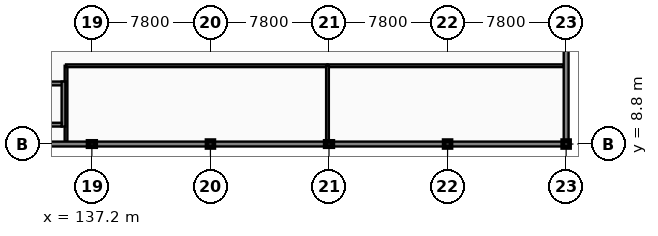
"""IFC4 building model, lengths in metres.
Left out: names, types, materials, properties, quantities, classifications, styles, units other than length and angle.
Written with IfcOpenShell. Run it as: python <this file> out.ifc"""

import sys

from ifc_helpers import new_model, si_unit, direction, frame, frame_2d, origin, origin_2d, place, context, subcontext, project, spatial, rectangle, extrude, element, fill, save


model = new_model("IFC4")
c1 = context("Model", 3, precision=1e-05, world=origin(), true_north=direction((0.0, 1.0)))
c2 = subcontext(c1, "Body", "Model", "MODEL_VIEW")
j1 = project(units=[si_unit("LENGTHUNIT", "METRE"), si_unit("PLANEANGLEUNIT", "RADIAN")], contexts=[c1])
p1 = place(None, origin())
s1 = spatial("IfcSite", under=j1, at=p1, CompositionType="ELEMENT")
p2 = place(p1, origin())
s2 = spatial("IfcBuilding", under=s1, at=p2, CompositionType="ELEMENT")
p3 = place(p2, origin())
s3 = spatial("IfcBuildingStorey", under=s2, at=p3, CompositionType="ELEMENT", Elevation=0.0)
p4 = place(p3, frame((137.2, 8.8, 0.0), z_axis=(0.0, 0.0, 1.0), x_axis=(1.0, 0.0, 0.0)))
e1 = element("IfcColumn", 1, at=p4, inside=s3, PredefinedType="PILASTER", context=c2, shape_type="SweptSolid", body=[
    extrude(rectangle(XDim=0.5, YDim=0.35, at=origin_2d()), origin(), (0.0, 0.0, 1.0), 5.4),
])
p5 = place(p3, frame((145.0, 8.8, 0.0), z_axis=(0.0, 0.0, 1.0), x_axis=(1.0, 0.0, 0.0)))
e2 = element("IfcColumn", 2, at=p5, inside=s3, PredefinedType="COLUMN", context=c2, shape_type="SweptSolid", body=[
    extrude(rectangle(XDim=0.45, YDim=0.45, at=origin_2d()), origin(), (0.0, 0.0, 1.0), 5.4),
])
p6 = place(p3, frame((152.8, 8.8, 0.0), z_axis=(0.0, 0.0, 1.0), x_axis=(1.0, 0.0, 0.0)))
e3 = element("IfcColumn", 3, at=p6, inside=s3, PredefinedType="PILASTER", context=c2, shape_type="SweptSolid", body=[
    extrude(rectangle(XDim=0.5, YDim=0.35, at=origin_2d()), origin(), (0.0, 0.0, 1.0), 5.4),
])
for number, where, z_axis, x_axis in (
    (4, (160.6, 8.8, 0.0), (0.0, 0.0, 1.0), (1.0, 0.0, 0.0)),
    (5, (168.4, 8.8, 0.0), (0.0, 0.0, 1.0), (1.0, 0.0, 0.0)),
):
    element("IfcColumn", number, at=place(p3, frame(where, z_axis=z_axis, x_axis=x_axis)), inside=s3, PredefinedType="COLUMN", context=c2, shape_type="SweptSolid", body=[
        extrude(rectangle(XDim=0.45, YDim=0.45, at=origin_2d()), origin(), (0.0, 0.0, 1.0), 5.4),
    ])
p7 = place(p3, frame((135.5, 8.95, 0.0), z_axis=(0.0, 0.0, 1.0), x_axis=(0.0, 1.0, 0.0)))
e6 = element("IfcWall", 6, at=p7, inside=s3, PredefinedType="PARTITIONING", context=c2, shape_type="SweptSolid", body=[
    extrude(rectangle(XDim=5.0, YDim=0.18, at=frame_2d((2.5, 0.0))), origin(), (0.0, 0.0, 1.0), 4.64),
])
p8 = place(p3, frame((135.5, 13.95, 0.0), z_axis=(0.0, 0.0, 1.0), x_axis=(1.0, 0.0, 0.0)))
e7 = element("IfcWall", 7, at=p8, inside=s3, PredefinedType="PARTITIONING", context=c2, shape_type="SweptSolid", body=[
    extrude(rectangle(XDim=17.2, YDim=0.18, at=frame_2d((8.6, 0.0))), origin(), (0.0, 0.0, 1.0), 4.64),
])
p9 = place(p8, frame((7.29, 0.0, -0.01)))
e8 = element("IfcOpeningElement", 8, at=p9, cuts=e7, PredefinedType="OPENING", context=c2, shape_type="SweptSolid", body=[
    extrude(rectangle(XDim=1.0, YDim=2.16, at=frame_2d((0.5, 1.08))), frame((0.0, 0.1, 0.0), z_axis=(0.0, -1.0, 0.0), x_axis=(1.0, 0.0, 0.0)), (0.0, 0.0, 1.0), 0.2),
])
p10 = place(p3, frame((152.7, 13.95, 0.0), z_axis=(0.0, 0.0, 1.0), x_axis=(1.0, 0.0, 0.0)))
e9 = element("IfcWall", 9, at=p10, inside=s3, PredefinedType="PARTITIONING", context=c2, shape_type="SweptSolid", body=[
    extrude(rectangle(XDim=15.55, YDim=0.18, at=frame_2d((7.775, 0.0))), origin(), (0.0, 0.0, 1.0), 4.64),
])
p11 = place(p10, frame((6.548, 0.0, -0.01)))
e10 = element("IfcOpeningElement", 10, at=p11, cuts=e9, PredefinedType="OPENING", context=c2, shape_type="SweptSolid", body=[
    extrude(rectangle(XDim=1.0, YDim=2.16, at=frame_2d((0.5, 1.08))), frame((0.0, 0.1, 0.0), z_axis=(0.0, -1.0, 0.0), x_axis=(1.0, 0.0, 0.0)), (0.0, 0.0, 1.0), 0.2),
])
p12 = place(p3, frame((152.7, 8.95, 0.0), z_axis=(0.0, 0.0, 1.0), x_axis=(0.0, 1.0, 0.0)))
e11 = element("IfcWall", 11, at=p12, inside=s3, PredefinedType="PARTITIONING", context=c2, shape_type="SweptSolid", body=[
    extrude(rectangle(XDim=5.0, YDim=0.18, at=frame_2d((2.5, 0.0))), origin(), (0.0, 0.0, 1.0), 4.64),
])
p13 = place(p3, frame((129.4, 8.8, 0.0), z_axis=(0.0, 0.0, 1.0), x_axis=(1.0, 0.0, 0.0)))
e12 = element("IfcWall", 12, at=p13, inside=s3, PredefinedType="SOLIDWALL", context=c2, shape_type="SweptSolid", body=[
    extrude(rectangle(XDim=7.8, YDim=0.32, at=frame_2d((3.9, 0.0))), origin(), (0.0, 0.0, 1.0), 4.64),
])
p14 = place(p13, frame((0.46, 0.0, 0.9)))
e13 = element("IfcOpeningElement", 13, at=p14, cuts=e12, PredefinedType="OPENING", context=c2, shape_type="SweptSolid", body=[
    extrude(rectangle(XDim=2.4, YDim=2.35, at=frame_2d((1.2, 1.175))), frame((0.0, 0.17, 0.0), z_axis=(0.0, -1.0, 0.0), x_axis=(1.0, 0.0, 0.0)), (0.0, 0.0, 1.0), 0.34),
])
p15 = place(p13, frame((3.46, 0.0, 0.9)))
e14 = element("IfcOpeningElement", 14, at=p15, cuts=e12, PredefinedType="OPENING", context=c2, shape_type="SweptSolid", body=[
    extrude(rectangle(XDim=2.4, YDim=2.35, at=frame_2d((1.2, 1.175))), frame((0.0, 0.17, 0.0), z_axis=(0.0, -1.0, 0.0), x_axis=(1.0, 0.0, 0.0)), (0.0, 0.0, 1.0), 0.34),
])
p16 = place(p3, frame((137.2, 8.8, 0.0), z_axis=(0.0, 0.0, 1.0), x_axis=(1.0, 0.0, 0.0)))
e15 = element("IfcWall", 15, at=p16, inside=s3, PredefinedType="SOLIDWALL", context=c2, shape_type="SweptSolid", body=[
    extrude(rectangle(XDim=7.8, YDim=0.32, at=frame_2d((3.9, 0.0))), origin(), (0.0, 0.0, 1.0), 4.64),
])
p17 = place(p16, frame((2.9, 0.0, -0.01)))
e16 = element("IfcOpeningElement", 16, at=p17, cuts=e15, PredefinedType="OPENING", context=c2, shape_type="SweptSolid", body=[
    extrude(rectangle(XDim=2.0, YDim=2.41, at=frame_2d((1.0, 1.205))), frame((0.0, 0.17, 0.0), z_axis=(0.0, -1.0, 0.0), x_axis=(1.0, 0.0, 0.0)), (0.0, 0.0, 1.0), 0.34),
])
p18 = place(p3, frame((145.0, 8.8, 0.0), z_axis=(0.0, 0.0, 1.0), x_axis=(1.0, 0.0, 0.0)))
e17 = element("IfcWall", 17, at=p18, inside=s3, PredefinedType="SOLIDWALL", context=c2, shape_type="SweptSolid", body=[
    extrude(rectangle(XDim=7.8, YDim=0.32, at=frame_2d((3.9, 0.0))), origin(), (0.0, 0.0, 1.0), 4.64),
])
p19 = place(p18, frame((0.46, 0.0, 0.9)))
e18 = element("IfcOpeningElement", 18, at=p19, cuts=e17, PredefinedType="OPENING", context=c2, shape_type="SweptSolid", body=[
    extrude(rectangle(XDim=2.4, YDim=2.35, at=frame_2d((1.2, 1.175))), frame((0.0, 0.17, 0.0), z_axis=(0.0, -1.0, 0.0), x_axis=(1.0, 0.0, 0.0)), (0.0, 0.0, 1.0), 0.34),
])
p20 = place(p18, frame((4.86, 0.0, 0.9)))
e19 = element("IfcOpeningElement", 19, at=p20, cuts=e17, PredefinedType="OPENING", context=c2, shape_type="SweptSolid", body=[
    extrude(rectangle(XDim=2.4, YDim=2.35, at=frame_2d((1.2, 1.175))), frame((0.0, 0.17, 0.0), z_axis=(0.0, -1.0, 0.0), x_axis=(1.0, 0.0, 0.0)), (0.0, 0.0, 1.0), 0.34),
])
p21 = place(p3, frame((152.8, 8.8, 0.0), z_axis=(0.0, 0.0, 1.0), x_axis=(1.0, 0.0, 0.0)))
e20 = element("IfcWall", 20, at=p21, inside=s3, PredefinedType="SOLIDWALL", context=c2, shape_type="SweptSolid", body=[
    extrude(rectangle(XDim=7.8, YDim=0.32, at=frame_2d((3.9, 0.0))), origin(), (0.0, 0.0, 1.0), 4.64),
])
p22 = place(p21, frame((0.46, 0.0, 0.9)))
e21 = element("IfcOpeningElement", 21, at=p22, cuts=e20, PredefinedType="OPENING", context=c2, shape_type="SweptSolid", body=[
    extrude(rectangle(XDim=2.4, YDim=2.35, at=frame_2d((1.2, 1.175))), frame((0.0, 0.17, 0.0), z_axis=(0.0, -1.0, 0.0), x_axis=(1.0, 0.0, 0.0)), (0.0, 0.0, 1.0), 0.34),
])
p23 = place(p21, frame((4.86, 0.0, 0.9)))
e22 = element("IfcOpeningElement", 22, at=p23, cuts=e20, PredefinedType="OPENING", context=c2, shape_type="SweptSolid", body=[
    extrude(rectangle(XDim=2.4, YDim=2.35, at=frame_2d((1.2, 1.175))), frame((0.0, 0.17, 0.0), z_axis=(0.0, -1.0, 0.0), x_axis=(1.0, 0.0, 0.0)), (0.0, 0.0, 1.0), 0.34),
])
p24 = place(p3, frame((160.6, 8.8, 0.0), z_axis=(0.0, 0.0, 1.0), x_axis=(1.0, 0.0, 0.0)))
e23 = element("IfcWall", 23, at=p24, inside=s3, PredefinedType="SOLIDWALL", context=c2, shape_type="SweptSolid", body=[
    extrude(rectangle(XDim=7.8, YDim=0.32, at=frame_2d((3.9, 0.0))), origin(), (0.0, 0.0, 1.0), 4.64),
])
p25 = place(p24, frame((0.46, 0.0, 0.9)))
e24 = element("IfcOpeningElement", 24, at=p25, cuts=e23, PredefinedType="OPENING", context=c2, shape_type="SweptSolid", body=[
    extrude(rectangle(XDim=2.4, YDim=2.35, at=frame_2d((1.2, 1.175))), frame((0.0, 0.17, 0.0), z_axis=(0.0, -1.0, 0.0), x_axis=(1.0, 0.0, 0.0)), (0.0, 0.0, 1.0), 0.34),
])
p26 = place(p24, frame((4.86, 0.0, 0.9)))
e25 = element("IfcOpeningElement", 25, at=p26, cuts=e23, PredefinedType="OPENING", context=c2, shape_type="SweptSolid", body=[
    extrude(rectangle(XDim=2.4, YDim=2.35, at=frame_2d((1.2, 1.175))), frame((0.0, 0.17, 0.0), z_axis=(0.0, -1.0, 0.0), x_axis=(1.0, 0.0, 0.0)), (0.0, 0.0, 1.0), 0.34),
])
p27 = place(p3, frame((168.4, 8.8, 0.0), z_axis=(0.0, 0.0, 1.0), x_axis=(0.0, 1.0, 0.0)))
e26 = element("IfcWall", 26, at=p27, inside=s3, PredefinedType="SOLIDWALL", context=c2, shape_type="SweptSolid", body=[
    extrude(rectangle(XDim=7.2, YDim=0.32, at=frame_2d((3.6, 0.0))), origin(), (0.0, 0.0, 1.0), 4.54),
])
p28 = place(p27, frame((0.46, 0.0, 0.9)))
e27 = element("IfcOpeningElement", 27, at=p28, cuts=e26, PredefinedType="OPENING", context=c2, shape_type="SweptSolid", body=[
    extrude(rectangle(XDim=1.8, YDim=2.2, at=frame_2d((0.9, 1.1))), frame((0.0, 0.17, 0.0), z_axis=(0.0, -1.0, 0.0), x_axis=(1.0, 0.0, 0.0)), (0.0, 0.0, 1.0), 0.34),
])
p29 = place(p27, frame((3.06, 0.0, 0.9)))
e28 = element("IfcOpeningElement", 28, at=p29, cuts=e26, PredefinedType="OPENING", context=c2, shape_type="SweptSolid", body=[
    extrude(rectangle(XDim=1.8, YDim=2.2, at=frame_2d((0.9, 1.1))), frame((0.0, 0.17, 0.0), z_axis=(0.0, -1.0, 0.0), x_axis=(1.0, 0.0, 0.0)), (0.0, 0.0, 1.0), 0.34),
])
p30 = place(p3, frame((133.25, 12.785, 0.0), z_axis=(0.0, 0.0, 1.0), x_axis=(1.0, 0.0, 0.0)))
e29 = element("IfcWall", 29, at=p30, inside=s3, PredefinedType="SHEAR", context=c2, shape_type="SweptSolid", body=[
    extrude(rectangle(XDim=2.21, YDim=0.25, at=frame_2d((1.105, 0.0))), origin(), (0.0, 0.0, 1.0), 5.4),
])
p31 = place(p3, frame((135.335, 9.95, 0.0), z_axis=(0.0, 0.0, 1.0), x_axis=(0.0, 1.0, 0.0)))
e30 = element("IfcWall", 30, at=p31, inside=s3, PredefinedType="SHEAR", context=c2, shape_type="SweptSolid", body=[
    extrude(rectangle(XDim=2.96, YDim=0.25, at=frame_2d((1.48, 0.0))), origin(), (0.0, 0.0, 1.0), 5.4),
])
p32 = place(p3, frame((133.25, 10.075, 0.0), z_axis=(0.0, 0.0, 1.0), x_axis=(1.0, 0.0, 0.0)))
e31 = element("IfcWall", 31, at=p32, inside=s3, PredefinedType="SHEAR", context=c2, shape_type="SweptSolid", body=[
    extrude(rectangle(XDim=1.96, YDim=0.25, at=frame_2d((0.98, 0.0))), origin(), (0.0, 0.0, 1.0), 5.4),
])
p33 = place(p32, frame((0.43, 0.0, -0.01)))
e32 = element("IfcOpeningElement", 32, at=p33, cuts=e31, PredefinedType="OPENING", context=c2, shape_type="SweptSolid", body=[
    extrude(rectangle(XDim=1.1, YDim=2.16, at=frame_2d((0.55, 1.08))), frame((0.0, 0.135, 0.0), z_axis=(0.0, -1.0, 0.0), x_axis=(1.0, 0.0, 0.0)), (0.0, 0.0, 1.0), 0.27),
])
p34 = place(p9, frame((0.0, 0.0, 0.01)))
e33 = element("IfcDoor", 33, at=p34, inside=s3, OperationType="SINGLE_SWING_RIGHT", PredefinedType="DOOR", context=c2, shape_type="SweptSolid", body=[
    extrude(rectangle(XDim=1.0, YDim=2.15, at=frame_2d((0.5, 1.075))), frame((0.0, 0.025, 0.0), z_axis=(0.0, -1.0, 0.0), x_axis=(1.0, 0.0, 0.0)), (0.0, 0.0, 1.0), 0.05),
])
fill(e8, e33)
p35 = place(p11, frame((0.0, 0.0, 0.01)))
e34 = element("IfcDoor", 34, at=p35, inside=s3, OperationType="SINGLE_SWING_LEFT", PredefinedType="DOOR", context=c2, shape_type="SweptSolid", body=[
    extrude(rectangle(XDim=1.0, YDim=2.15, at=frame_2d((0.5, 1.075))), frame((0.0, 0.025, 0.0), z_axis=(0.0, -1.0, 0.0), x_axis=(1.0, 0.0, 0.0)), (0.0, 0.0, 1.0), 0.05),
])
fill(e10, e34)
p36 = place(p15, origin())
e35 = element("IfcWindow", 35, at=p36, inside=s3, PartitioningType="TRIPLE_PANEL_VERTICAL", PredefinedType="WINDOW", context=c2, shape_type="SweptSolid", body=[
    extrude(rectangle(XDim=2.4, YDim=2.35, at=frame_2d((1.2, 1.175))), frame((0.0, 0.03, 0.0), z_axis=(0.0, -1.0, 0.0), x_axis=(1.0, 0.0, 0.0)), (0.0, 0.0, 1.0), 0.06),
])
fill(e14, e35)
p37 = place(p17, frame((0.0, 0.0, 0.01)))
e36 = element("IfcDoor", 36, at=p37, inside=s3, OperationType="DOUBLE_SWING_LEFT", PredefinedType="DOOR", context=c2, shape_type="SweptSolid", body=[
    extrude(rectangle(XDim=2.0, YDim=2.4, at=frame_2d((1.0, 1.2))), frame((0.0, 0.025, 0.0), z_axis=(0.0, -1.0, 0.0), x_axis=(1.0, 0.0, 0.0)), (0.0, 0.0, 1.0), 0.05),
])
fill(e16, e36)
p38 = place(p19, origin())
e37 = element("IfcWindow", 37, at=p38, inside=s3, PartitioningType="TRIPLE_PANEL_VERTICAL", PredefinedType="WINDOW", context=c2, shape_type="SweptSolid", body=[
    extrude(rectangle(XDim=2.4, YDim=2.35, at=frame_2d((1.2, 1.175))), frame((0.0, 0.03, 0.0), z_axis=(0.0, -1.0, 0.0), x_axis=(1.0, 0.0, 0.0)), (0.0, 0.0, 1.0), 0.06),
])
fill(e18, e37)
p39 = place(p20, origin())
e38 = element("IfcWindow", 38, at=p39, inside=s3, PartitioningType="TRIPLE_PANEL_VERTICAL", PredefinedType="WINDOW", context=c2, shape_type="SweptSolid", body=[
    extrude(rectangle(XDim=2.4, YDim=2.35, at=frame_2d((1.2, 1.175))), frame((0.0, 0.03, 0.0), z_axis=(0.0, -1.0, 0.0), x_axis=(1.0, 0.0, 0.0)), (0.0, 0.0, 1.0), 0.06),
])
fill(e19, e38)
p40 = place(p22, origin())
e39 = element("IfcWindow", 39, at=p40, inside=s3, PartitioningType="TRIPLE_PANEL_VERTICAL", PredefinedType="WINDOW", context=c2, shape_type="SweptSolid", body=[
    extrude(rectangle(XDim=2.4, YDim=2.35, at=frame_2d((1.2, 1.175))), frame((0.0, 0.03, 0.0), z_axis=(0.0, -1.0, 0.0), x_axis=(1.0, 0.0, 0.0)), (0.0, 0.0, 1.0), 0.06),
])
fill(e21, e39)
p41 = place(p23, origin())
e40 = element("IfcWindow", 40, at=p41, inside=s3, PartitioningType="TRIPLE_PANEL_VERTICAL", PredefinedType="WINDOW", context=c2, shape_type="SweptSolid", body=[
    extrude(rectangle(XDim=2.4, YDim=2.35, at=frame_2d((1.2, 1.175))), frame((0.0, 0.03, 0.0), z_axis=(0.0, -1.0, 0.0), x_axis=(1.0, 0.0, 0.0)), (0.0, 0.0, 1.0), 0.06),
])
fill(e22, e40)
p42 = place(p25, origin())
e41 = element("IfcWindow", 41, at=p42, inside=s3, PartitioningType="TRIPLE_PANEL_VERTICAL", PredefinedType="WINDOW", context=c2, shape_type="SweptSolid", body=[
    extrude(rectangle(XDim=2.4, YDim=2.35, at=frame_2d((1.2, 1.175))), frame((0.0, 0.03, 0.0), z_axis=(0.0, -1.0, 0.0), x_axis=(1.0, 0.0, 0.0)), (0.0, 0.0, 1.0), 0.06),
])
fill(e24, e41)
p43 = place(p26, origin())
e42 = element("IfcWindow", 42, at=p43, inside=s3, PartitioningType="TRIPLE_PANEL_VERTICAL", PredefinedType="WINDOW", context=c2, shape_type="SweptSolid", body=[
    extrude(rectangle(XDim=2.4, YDim=2.35, at=frame_2d((1.2, 1.175))), frame((0.0, 0.03, 0.0), z_axis=(0.0, -1.0, 0.0), x_axis=(1.0, 0.0, 0.0)), (0.0, 0.0, 1.0), 0.06),
])
fill(e25, e42)
p44 = place(p28, origin())
e43 = element("IfcWindow", 43, at=p44, inside=s3, PartitioningType="DOUBLE_PANEL_VERTICAL", PredefinedType="WINDOW", context=c2, shape_type="SweptSolid", body=[
    extrude(rectangle(XDim=1.8, YDim=2.2, at=frame_2d((0.9, 1.1))), frame((0.0, 0.03, 0.0), z_axis=(0.0, -1.0, 0.0), x_axis=(1.0, 0.0, 0.0)), (0.0, 0.0, 1.0), 0.06),
])
fill(e27, e43)
p45 = place(p29, origin())
e44 = element("IfcWindow", 44, at=p45, inside=s3, PartitioningType="DOUBLE_PANEL_VERTICAL", PredefinedType="WINDOW", context=c2, shape_type="SweptSolid", body=[
    extrude(rectangle(XDim=1.8, YDim=2.2, at=frame_2d((0.9, 1.1))), frame((0.0, 0.03, 0.0), z_axis=(0.0, -1.0, 0.0), x_axis=(1.0, 0.0, 0.0)), (0.0, 0.0, 1.0), 0.06),
])
fill(e28, e44)
p46 = place(p33, frame((0.0, 0.0, 0.01)))
e45 = element("IfcDoor", 45, at=p46, inside=s3, OperationType="SLIDING_TO_LEFT", PredefinedType="DOOR", context=c2, shape_type="SweptSolid", body=[
    extrude(rectangle(XDim=1.1, YDim=2.15, at=frame_2d((0.55, 1.075))), frame((0.0, 0.025, 0.0), z_axis=(0.0, -1.0, 0.0), x_axis=(1.0, 0.0, 0.0)), (0.0, 0.0, 1.0), 0.05),
])
fill(e32, e45)
save(model, sys.argv[1])
